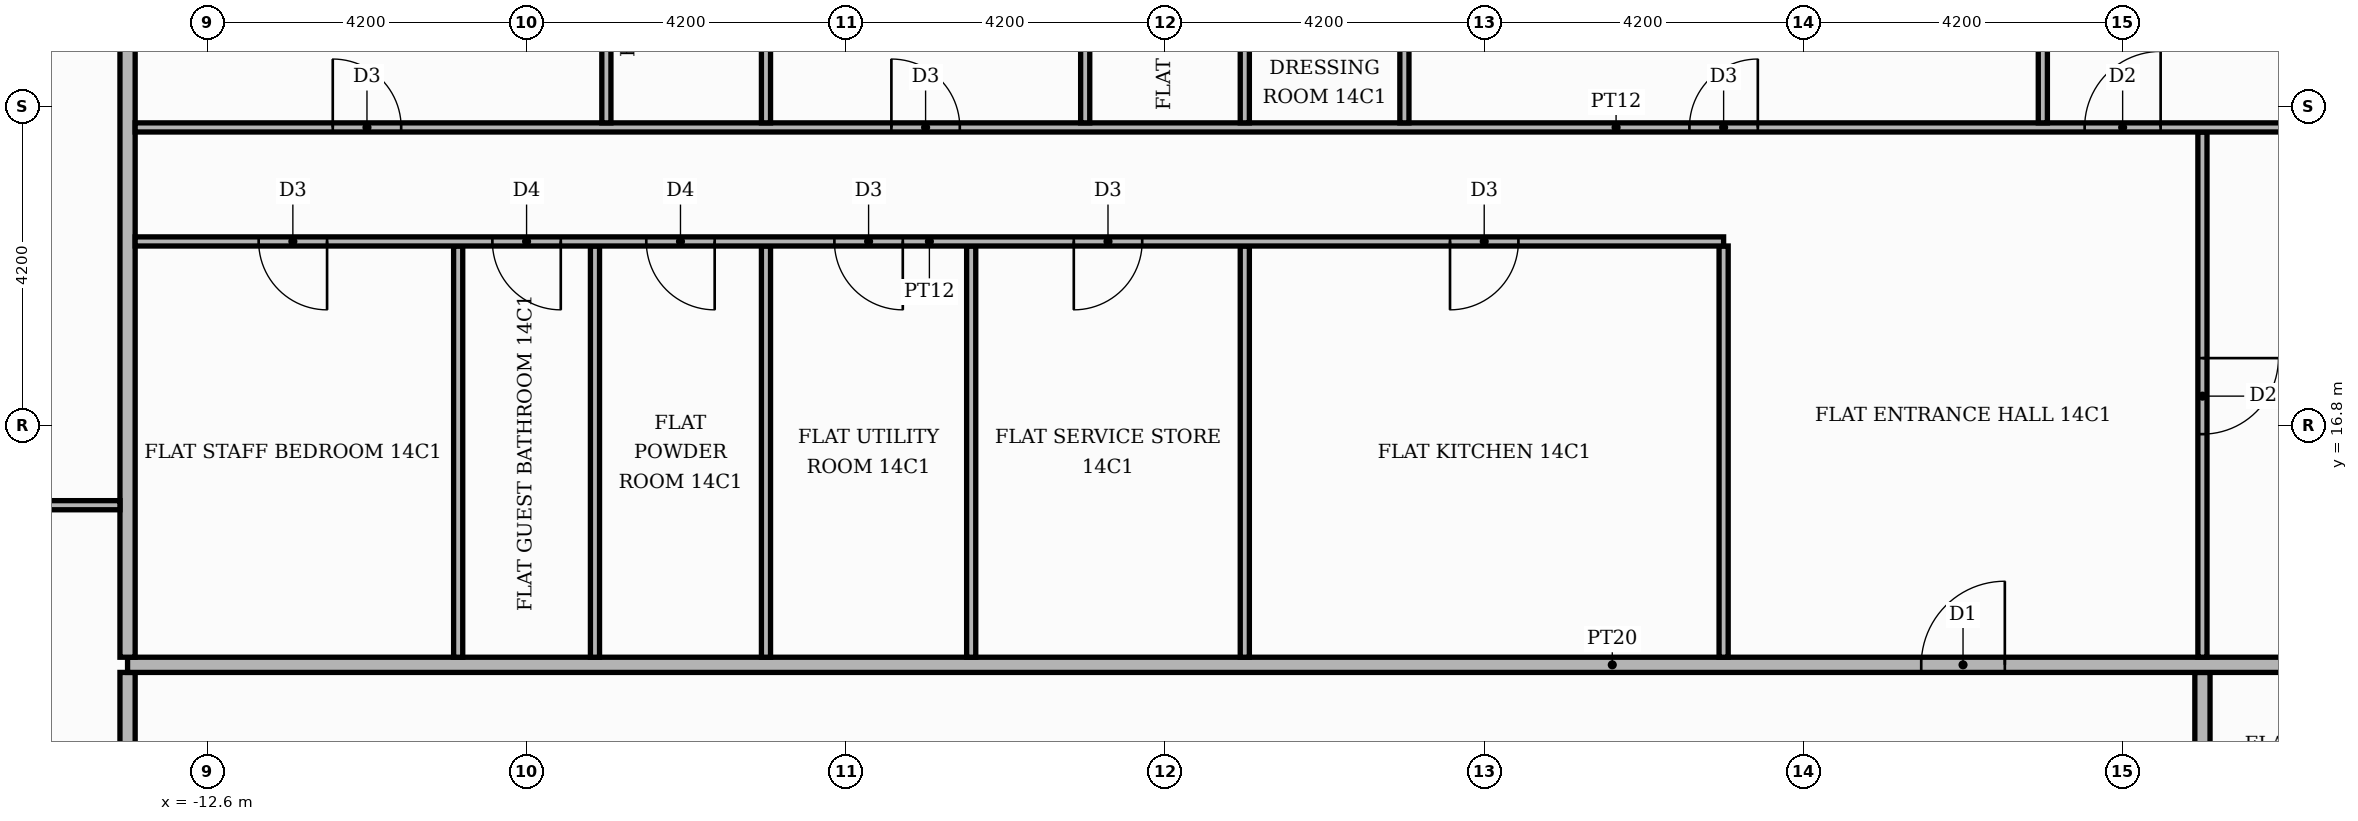
"""IFC4 building model, lengths in metres.
Left out: names, types, materials, properties, quantities, classifications, styles, units other than length and angle.
Written with IfcOpenShell. Run it as: python <this file> out.ifc"""

import sys

from ifc_helpers import new_model, si_unit, direction, frame, frame_2d, origin, place, context, subcontext, project, spatial, rectangle, extrude, element, fill, save


model = new_model("IFC4")
c1 = context("Model", 3, precision=1e-05, world=origin(), true_north=direction((0.0, 1.0)))
c2 = subcontext(c1, "Body", "Model", "MODEL_VIEW")
j1 = project(units=[si_unit("LENGTHUNIT", "METRE"), si_unit("PLANEANGLEUNIT", "RADIAN")], contexts=[c1])
p1 = place(None, origin())
s1 = spatial("IfcSite", under=j1, at=p1, CompositionType="ELEMENT")
p2 = place(p1, origin())
s2 = spatial("IfcBuilding", under=s1, at=p2, CompositionType="ELEMENT")
p3 = place(p2, frame((0.0, 0.0, 62.1)))
s3 = spatial("IfcBuildingStorey", under=s2, at=p3, CompositionType="ELEMENT", Elevation=62.1)
p4 = place(p3, frame((13.65, -5.15, 0.0), z_axis=(0.0, 0.0, 1.0), x_axis=(0.0, 1.0, 0.0)))
e1 = element("IfcWall", 1, at=p4, inside=s3, PredefinedType="PARTITIONING", context=c2, shape_type="SweptSolid", body=[
    extrude(rectangle(XDim=18.7, YDim=0.2, at=frame_2d((9.35, 0.0))), origin(), (0.0, 0.0, 1.0), 3.48),
])
p5 = place(p4, frame((5.65, 0.0, 0.0)))
e2 = element("IfcOpeningElement", 2, at=p5, cuts=e1, PredefinedType="OPENING", context=c2, shape_type="SweptSolid", body=[
    extrude(rectangle(XDim=1.1, YDim=2.4, at=frame_2d((0.55, 1.2))), frame((0.0, 0.11, 0.0), z_axis=(0.0, -1.0, 0.0), x_axis=(1.0, 0.0, 0.0)), (0.0, 0.0, 1.0), 0.22),
])
p6 = place(p3, frame((-13.65, 5.35, 0.0), z_axis=(0.0, 0.0, 1.0), x_axis=(0.0, 1.0, 0.0)))
e3 = element("IfcWall", 3, at=p6, inside=s3, PredefinedType="PARTITIONING", context=c2, shape_type="SweptSolid", body=[
    extrude(rectangle(XDim=8.2, YDim=0.2, at=frame_2d((4.1, 0.0))), origin(), (0.0, 0.0, 1.0), 3.48),
])
p7 = place(p6, frame((5.65, 0.0, 0.0)))
e4 = element("IfcOpeningElement", 4, at=p7, cuts=e3, PredefinedType="OPENING", context=c2, shape_type="SweptSolid", body=[
    extrude(rectangle(XDim=1.1, YDim=2.4, at=frame_2d((0.55, 1.2))), frame((0.0, 0.11, 0.0), z_axis=(0.0, -1.0, 0.0), x_axis=(1.0, 0.0, 0.0)), (0.0, 0.0, 1.0), 0.22),
])
p8 = place(p3, frame((-13.65, 13.65, 0.0), z_axis=(0.0, 0.0, 1.0), x_axis=(1.0, 0.0, 0.0)))
e5 = element("IfcWall", 5, at=p8, inside=s3, PredefinedType="PARTITIONING", context=c2, shape_type="SweptSolid", body=[
    extrude(rectangle(XDim=39.07, YDim=0.2, at=frame_2d((19.535, 0.0))), origin(), (0.0, 0.0, 1.0), 3.48),
])
p9 = place(p8, frame((23.6, 0.0, 0.0)))
e6 = element("IfcOpeningElement", 6, at=p9, cuts=e5, PredefinedType="OPENING", context=c2, shape_type="SweptSolid", body=[
    extrude(rectangle(XDim=1.1, YDim=2.4, at=frame_2d((0.55, 1.2))), frame((0.0, 0.11, 0.0), z_axis=(0.0, -1.0, 0.0), x_axis=(1.0, 0.0, 0.0)), (0.0, 0.0, 1.0), 0.22),
])
p10 = place(p3, frame((-13.65, 13.75, 0.0), z_axis=(0.0, 0.0, 1.0), x_axis=(0.0, 1.0, 0.0)))
e7 = element("IfcWall", 7, at=p10, inside=s3, PredefinedType="PARTITIONING", context=c2, shape_type="SweptSolid", body=[
    extrude(rectangle(XDim=11.67, YDim=0.2, at=frame_2d((5.835, 0.0))), origin(), (0.0, 0.0, 1.0), 3.48),
])
for number, where, z_axis, x_axis in (
    (8, (-9.3, 13.75, 0.0), (0.0, 0.0, 1.0), (0.0, 1.0, 0.0)),
    (9, (-7.5, 13.75, 0.0), (0.0, 0.0, 1.0), (0.0, 1.0, 0.0)),
    (10, (-5.25, 13.75, 0.0), (0.0, 0.0, 1.0), (0.0, 1.0, 0.0)),
    (11, (-2.55, 13.75, 0.0), (0.0, 0.0, 1.0), (0.0, 1.0, 0.0)),
    (12, (1.05, 13.75, 0.0), (0.0, 0.0, 1.0), (0.0, 1.0, 0.0)),
    (13, (7.35, 13.75, 0.0), (0.0, 0.0, 1.0), (0.0, 1.0, 0.0)),
):
    element("IfcWall", number, at=place(p3, frame(where, z_axis=z_axis, x_axis=x_axis)), inside=s3, PredefinedType="PARTITIONING", context=c2, shape_type="SweptSolid", body=[
        extrude(rectangle(XDim=5.41, YDim=0.12, at=frame_2d((2.705, 0.0))), origin(), (0.0, 0.0, 1.0), 3.48),
    ])
p11 = place(p3, frame((13.65, 13.75, 0.0), z_axis=(0.0, 0.0, 1.0), x_axis=(0.0, 1.0, 0.0)))
e14 = element("IfcWall", 14, at=p11, inside=s3, PredefinedType="PARTITIONING", context=c2, shape_type="SweptSolid", body=[
    extrude(rectangle(XDim=6.91, YDim=0.12, at=frame_2d((3.455, 0.0))), origin(), (0.0, 0.0, 1.0), 3.48),
])
p12 = place(p11, frame((2.935, 0.0, 0.0)))
e15 = element("IfcOpeningElement", 15, at=p12, cuts=e14, PredefinedType="OPENING", context=c2, shape_type="SweptSolid", body=[
    extrude(rectangle(XDim=1.0, YDim=2.1, at=frame_2d((0.5, 1.05))), frame((0.0, 0.07, 0.0), z_axis=(0.0, -1.0, 0.0), x_axis=(1.0, 0.0, 0.0)), (0.0, 0.0, 1.0), 0.14),
])
p13 = place(p3, frame((-20.12, 15.75, 0.0), z_axis=(0.0, 0.0, 1.0), x_axis=(1.0, 0.0, 0.0)))
e16 = element("IfcWall", 16, at=p13, inside=s3, PredefinedType="PARTITIONING", context=c2, shape_type="SweptSolid", body=[
    extrude(rectangle(XDim=6.37, YDim=0.12, at=frame_2d((3.185, 0.0))), origin(), (0.0, 0.0, 1.0), 3.48),
])
p14 = place(p13, frame((2.735, 0.0, 0.0)))
e17 = element("IfcOpeningElement", 17, at=p14, cuts=e16, PredefinedType="OPENING", context=c2, shape_type="SweptSolid", body=[
    extrude(rectangle(XDim=1.0, YDim=2.1, at=frame_2d((0.5, 1.05))), frame((0.0, 0.07, 0.0), z_axis=(0.0, -1.0, 0.0), x_axis=(1.0, 0.0, 0.0)), (0.0, 0.0, 1.0), 0.14),
])
p15 = place(p3, frame((-13.55, 19.22, 0.0), z_axis=(0.0, 0.0, 1.0), x_axis=(1.0, 0.0, 0.0)))
e18 = element("IfcWall", 18, at=p15, inside=s3, PredefinedType="PARTITIONING", context=c2, shape_type="SweptSolid", body=[
    extrude(rectangle(XDim=20.9, YDim=0.12, at=frame_2d((10.45, 0.0))), origin(), (0.0, 0.0, 1.0), 3.48),
])
p16 = place(p15, frame((17.3, 0.0, 0.0)))
e19 = element("IfcOpeningElement", 19, at=p16, cuts=e18, PredefinedType="OPENING", context=c2, shape_type="SweptSolid", body=[
    extrude(rectangle(XDim=0.9, YDim=2.1, at=frame_2d((0.45, 1.05))), frame((0.0, 0.07, 0.0), z_axis=(0.0, -1.0, 0.0), x_axis=(1.0, 0.0, 0.0)), (0.0, 0.0, 1.0), 0.14),
])
p17 = place(p15, frame((12.35, 0.0, 0.0)))
e20 = element("IfcOpeningElement", 20, at=p17, cuts=e18, PredefinedType="OPENING", context=c2, shape_type="SweptSolid", body=[
    extrude(rectangle(XDim=0.9, YDim=2.1, at=frame_2d((0.45, 1.05))), frame((0.0, 0.07, 0.0), z_axis=(0.0, -1.0, 0.0), x_axis=(1.0, 0.0, 0.0)), (0.0, 0.0, 1.0), 0.14),
])
p18 = place(p15, frame((9.2, 0.0, 0.0)))
e21 = element("IfcOpeningElement", 21, at=p18, cuts=e18, PredefinedType="OPENING", context=c2, shape_type="SweptSolid", body=[
    extrude(rectangle(XDim=0.9, YDim=2.1, at=frame_2d((0.45, 1.05))), frame((0.0, 0.07, 0.0), z_axis=(0.0, -1.0, 0.0), x_axis=(1.0, 0.0, 0.0)), (0.0, 0.0, 1.0), 0.14),
])
p19 = place(p15, frame((6.725, 0.0, 0.0)))
e22 = element("IfcOpeningElement", 22, at=p19, cuts=e18, PredefinedType="OPENING", context=c2, shape_type="SweptSolid", body=[
    extrude(rectangle(XDim=0.9, YDim=2.1, at=frame_2d((0.45, 1.05))), frame((0.0, 0.07, 0.0), z_axis=(0.0, -1.0, 0.0), x_axis=(1.0, 0.0, 0.0)), (0.0, 0.0, 1.0), 0.14),
])
p20 = place(p15, frame((4.7, 0.0, 0.0)))
e23 = element("IfcOpeningElement", 23, at=p20, cuts=e18, PredefinedType="OPENING", context=c2, shape_type="SweptSolid", body=[
    extrude(rectangle(XDim=0.9, YDim=2.1, at=frame_2d((0.45, 1.05))), frame((0.0, 0.07, 0.0), z_axis=(0.0, -1.0, 0.0), x_axis=(1.0, 0.0, 0.0)), (0.0, 0.0, 1.0), 0.14),
])
p21 = place(p15, frame((1.625, 0.0, 0.0)))
e24 = element("IfcOpeningElement", 24, at=p21, cuts=e18, PredefinedType="OPENING", context=c2, shape_type="SweptSolid", body=[
    extrude(rectangle(XDim=0.9, YDim=2.1, at=frame_2d((0.45, 1.05))), frame((0.0, 0.07, 0.0), z_axis=(0.0, -1.0, 0.0), x_axis=(1.0, 0.0, 0.0)), (0.0, 0.0, 1.0), 0.14),
])
p22 = place(p3, frame((-13.55, 20.72, 0.0), z_axis=(0.0, 0.0, 1.0), x_axis=(1.0, 0.0, 0.0)))
e25 = element("IfcWall", 25, at=p22, inside=s3, PredefinedType="PARTITIONING", context=c2, shape_type="SweptSolid", body=[
    extrude(rectangle(XDim=38.97, YDim=0.12, at=frame_2d((19.485, 0.0))), origin(), (0.0, 0.0, 1.0), 3.48),
])
p23 = place(p22, frame((25.65, 0.0, 0.0)))
e26 = element("IfcOpeningElement", 26, at=p23, cuts=e25, PredefinedType="OPENING", context=c2, shape_type="SweptSolid", body=[
    extrude(rectangle(XDim=1.0, YDim=2.1, at=frame_2d((0.5, 1.05))), frame((0.0, 0.07, 0.0), z_axis=(0.0, -1.0, 0.0), x_axis=(1.0, 0.0, 0.0)), (0.0, 0.0, 1.0), 0.14),
])
p24 = place(p22, frame((20.45, 0.0, 0.0)))
e27 = element("IfcOpeningElement", 27, at=p24, cuts=e25, PredefinedType="OPENING", context=c2, shape_type="SweptSolid", body=[
    extrude(rectangle(XDim=0.9, YDim=2.1, at=frame_2d((0.45, 1.05))), frame((0.0, 0.07, 0.0), z_axis=(0.0, -1.0, 0.0), x_axis=(1.0, 0.0, 0.0)), (0.0, 0.0, 1.0), 0.14),
])
p25 = place(p22, frame((9.95, 0.0, 0.0)))
e28 = element("IfcOpeningElement", 28, at=p25, cuts=e25, PredefinedType="OPENING", context=c2, shape_type="SweptSolid", body=[
    extrude(rectangle(XDim=0.9, YDim=2.1, at=frame_2d((0.45, 1.05))), frame((0.0, 0.07, 0.0), z_axis=(0.0, -1.0, 0.0), x_axis=(1.0, 0.0, 0.0)), (0.0, 0.0, 1.0), 0.14),
])
p26 = place(p22, frame((2.6, 0.0, 0.0)))
e29 = element("IfcOpeningElement", 29, at=p26, cuts=e25, PredefinedType="OPENING", context=c2, shape_type="SweptSolid", body=[
    extrude(rectangle(XDim=0.9, YDim=2.1, at=frame_2d((0.45, 1.05))), frame((0.0, 0.07, 0.0), z_axis=(0.0, -1.0, 0.0), x_axis=(1.0, 0.0, 0.0)), (0.0, 0.0, 1.0), 0.14),
])
p27 = place(p3, frame((-7.35, 20.78, 0.0), z_axis=(0.0, 0.0, 1.0), x_axis=(0.0, 1.0, 0.0)))
e30 = element("IfcWall", 30, at=p27, inside=s3, PredefinedType="PARTITIONING", context=c2, shape_type="SweptSolid", body=[
    extrude(rectangle(XDim=4.64, YDim=0.12, at=frame_2d((2.32, 0.0))), origin(), (0.0, 0.0, 1.0), 3.48),
])
p28 = place(p3, frame((-5.25, 20.78, 0.0), z_axis=(0.0, 0.0, 1.0), x_axis=(0.0, 1.0, 0.0)))
e31 = element("IfcWall", 31, at=p28, inside=s3, PredefinedType="PARTITIONING", context=c2, shape_type="SweptSolid", body=[
    extrude(rectangle(XDim=4.64, YDim=0.12, at=frame_2d((2.32, 0.0))), origin(), (0.0, 0.0, 1.0), 3.48),
])
p29 = place(p28, frame((1.99, 0.0, 0.0)))
e32 = element("IfcOpeningElement", 32, at=p29, cuts=e31, PredefinedType="OPENING", context=c2, shape_type="SweptSolid", body=[
    extrude(rectangle(XDim=0.9, YDim=2.1, at=frame_2d((0.45, 1.05))), frame((0.0, 0.07, 0.0), z_axis=(0.0, -1.0, 0.0), x_axis=(1.0, 0.0, 0.0)), (0.0, 0.0, 1.0), 0.14),
])
p30 = place(p3, frame((-1.05, 20.78, 0.0), z_axis=(0.0, 0.0, 1.0), x_axis=(0.0, 1.0, 0.0)))
e33 = element("IfcWall", 33, at=p30, inside=s3, PredefinedType="PARTITIONING", context=c2, shape_type="SweptSolid", body=[
    extrude(rectangle(XDim=4.64, YDim=0.12, at=frame_2d((2.32, 0.0))), origin(), (0.0, 0.0, 1.0), 3.48),
])
p31 = place(p3, frame((1.05, 20.78, 0.0), z_axis=(0.0, 0.0, 1.0), x_axis=(0.0, 1.0, 0.0)))
e34 = element("IfcWall", 34, at=p31, inside=s3, PredefinedType="PARTITIONING", context=c2, shape_type="SweptSolid", body=[
    extrude(rectangle(XDim=4.64, YDim=0.12, at=frame_2d((2.32, 0.0))), origin(), (0.0, 0.0, 1.0), 3.48),
])
p32 = place(p31, frame((1.99, 0.0, 0.0)))
e35 = element("IfcOpeningElement", 35, at=p32, cuts=e34, PredefinedType="OPENING", context=c2, shape_type="SweptSolid", body=[
    extrude(rectangle(XDim=0.9, YDim=2.1, at=frame_2d((0.45, 1.05))), frame((0.0, 0.07, 0.0), z_axis=(0.0, -1.0, 0.0), x_axis=(1.0, 0.0, 0.0)), (0.0, 0.0, 1.0), 0.14),
])
p33 = place(p3, frame((3.15, 20.78, 0.0), z_axis=(0.0, 0.0, 1.0), x_axis=(0.0, 1.0, 0.0)))
e36 = element("IfcWall", 36, at=p33, inside=s3, PredefinedType="PARTITIONING", context=c2, shape_type="SweptSolid", body=[
    extrude(rectangle(XDim=4.64, YDim=0.12, at=frame_2d((2.32, 0.0))), origin(), (0.0, 0.0, 1.0), 3.48),
])
p34 = place(p33, frame((1.99, 0.0, 0.0)))
e37 = element("IfcOpeningElement", 37, at=p34, cuts=e36, PredefinedType="OPENING", context=c2, shape_type="SweptSolid", body=[
    extrude(rectangle(XDim=0.9, YDim=2.1, at=frame_2d((0.45, 1.05))), frame((0.0, 0.07, 0.0), z_axis=(0.0, -1.0, 0.0), x_axis=(1.0, 0.0, 0.0)), (0.0, 0.0, 1.0), 0.14),
])
p35 = place(p3, frame((11.55, 20.78, 0.0), z_axis=(0.0, 0.0, 1.0), x_axis=(0.0, 1.0, 0.0)))
e38 = element("IfcWall", 38, at=p35, inside=s3, PredefinedType="PARTITIONING", context=c2, shape_type="SweptSolid", body=[
    extrude(rectangle(XDim=4.64, YDim=0.12, at=frame_2d((2.32, 0.0))), origin(), (0.0, 0.0, 1.0), 3.48),
])
p36 = place(p9, origin())
e39 = element("IfcDoor", 39, at=p36, inside=s3, OperationType="SINGLE_SWING_RIGHT", PredefinedType="DOOR", context=c2, shape_type="SweptSolid", body=[
    extrude(rectangle(XDim=1.1, YDim=2.4, at=frame_2d((0.55, 1.2))), frame((0.0, 0.025, 0.0), z_axis=(0.0, -1.0, 0.0), x_axis=(1.0, 0.0, 0.0)), (0.0, 0.0, 1.0), 0.05),
])
fill(e6, e39)
p37 = place(p12, frame((1.0, 0.0, 0.0), z_axis=(0.0, 0.0, 1.0), x_axis=(-1.0, 0.0, 0.0)))
e40 = element("IfcDoor", 40, at=p37, inside=s3, OperationType="SINGLE_SWING_RIGHT", PredefinedType="DOOR", context=c2, shape_type="SweptSolid", body=[
    extrude(rectangle(XDim=1.0, YDim=2.1, at=frame_2d((0.5, 1.05))), frame((0.0, 0.025, 0.0), z_axis=(0.0, -1.0, 0.0), x_axis=(1.0, 0.0, 0.0)), (0.0, 0.0, 1.0), 0.05),
])
fill(e15, e40)
p38 = place(p16, frame((0.9, 0.0, 0.0), z_axis=(0.0, 0.0, 1.0), x_axis=(-1.0, 0.0, 0.0)))
e41 = element("IfcDoor", 41, at=p38, inside=s3, OperationType="SINGLE_SWING_LEFT", PredefinedType="DOOR", context=c2, shape_type="SweptSolid", body=[
    extrude(rectangle(XDim=0.9, YDim=2.1, at=frame_2d((0.45, 1.05))), frame((0.0, 0.025, 0.0), z_axis=(0.0, -1.0, 0.0), x_axis=(1.0, 0.0, 0.0)), (0.0, 0.0, 1.0), 0.05),
])
fill(e19, e41)
p39 = place(p17, frame((0.9, 0.0, 0.0), z_axis=(0.0, 0.0, 1.0), x_axis=(-1.0, 0.0, 0.0)))
e42 = element("IfcDoor", 42, at=p39, inside=s3, OperationType="SINGLE_SWING_LEFT", PredefinedType="DOOR", context=c2, shape_type="SweptSolid", body=[
    extrude(rectangle(XDim=0.9, YDim=2.1, at=frame_2d((0.45, 1.05))), frame((0.0, 0.025, 0.0), z_axis=(0.0, -1.0, 0.0), x_axis=(1.0, 0.0, 0.0)), (0.0, 0.0, 1.0), 0.05),
])
fill(e20, e42)
p40 = place(p18, frame((0.9, 0.0, 0.0), z_axis=(0.0, 0.0, 1.0), x_axis=(-1.0, 0.0, 0.0)))
e43 = element("IfcDoor", 43, at=p40, inside=s3, OperationType="SINGLE_SWING_RIGHT", PredefinedType="DOOR", context=c2, shape_type="SweptSolid", body=[
    extrude(rectangle(XDim=0.9, YDim=2.1, at=frame_2d((0.45, 1.05))), frame((0.0, 0.025, 0.0), z_axis=(0.0, -1.0, 0.0), x_axis=(1.0, 0.0, 0.0)), (0.0, 0.0, 1.0), 0.05),
])
fill(e21, e43)
p41 = place(p19, frame((0.9, 0.0, 0.0), z_axis=(0.0, 0.0, 1.0), x_axis=(-1.0, 0.0, 0.0)))
e44 = element("IfcDoor", 44, at=p41, inside=s3, OperationType="SINGLE_SWING_RIGHT", PredefinedType="DOOR", context=c2, shape_type="SweptSolid", body=[
    extrude(rectangle(XDim=0.9, YDim=2.1, at=frame_2d((0.45, 1.05))), frame((0.0, 0.025, 0.0), z_axis=(0.0, -1.0, 0.0), x_axis=(1.0, 0.0, 0.0)), (0.0, 0.0, 1.0), 0.05),
])
fill(e22, e44)
p42 = place(p20, frame((0.9, 0.0, 0.0), z_axis=(0.0, 0.0, 1.0), x_axis=(-1.0, 0.0, 0.0)))
e45 = element("IfcDoor", 45, at=p42, inside=s3, OperationType="SINGLE_SWING_RIGHT", PredefinedType="DOOR", context=c2, shape_type="SweptSolid", body=[
    extrude(rectangle(XDim=0.9, YDim=2.1, at=frame_2d((0.45, 1.05))), frame((0.0, 0.025, 0.0), z_axis=(0.0, -1.0, 0.0), x_axis=(1.0, 0.0, 0.0)), (0.0, 0.0, 1.0), 0.05),
])
fill(e23, e45)
p43 = place(p21, frame((0.9, 0.0, 0.0), z_axis=(0.0, 0.0, 1.0), x_axis=(-1.0, 0.0, 0.0)))
e46 = element("IfcDoor", 46, at=p43, inside=s3, OperationType="SINGLE_SWING_RIGHT", PredefinedType="DOOR", context=c2, shape_type="SweptSolid", body=[
    extrude(rectangle(XDim=0.9, YDim=2.1, at=frame_2d((0.45, 1.05))), frame((0.0, 0.025, 0.0), z_axis=(0.0, -1.0, 0.0), x_axis=(1.0, 0.0, 0.0)), (0.0, 0.0, 1.0), 0.05),
])
fill(e24, e46)
p44 = place(p23, origin())
e47 = element("IfcDoor", 47, at=p44, inside=s3, OperationType="SINGLE_SWING_RIGHT", PredefinedType="DOOR", context=c2, shape_type="SweptSolid", body=[
    extrude(rectangle(XDim=1.0, YDim=2.1, at=frame_2d((0.5, 1.05))), frame((0.0, 0.025, 0.0), z_axis=(0.0, -1.0, 0.0), x_axis=(1.0, 0.0, 0.0)), (0.0, 0.0, 1.0), 0.05),
])
fill(e26, e47)
p45 = place(p24, origin())
e48 = element("IfcDoor", 48, at=p45, inside=s3, OperationType="SINGLE_SWING_RIGHT", PredefinedType="DOOR", context=c2, shape_type="SweptSolid", body=[
    extrude(rectangle(XDim=0.9, YDim=2.1, at=frame_2d((0.45, 1.05))), frame((0.0, 0.025, 0.0), z_axis=(0.0, -1.0, 0.0), x_axis=(1.0, 0.0, 0.0)), (0.0, 0.0, 1.0), 0.05),
])
fill(e27, e48)
p46 = place(p25, origin())
e49 = element("IfcDoor", 49, at=p46, inside=s3, OperationType="SINGLE_SWING_LEFT", PredefinedType="DOOR", context=c2, shape_type="SweptSolid", body=[
    extrude(rectangle(XDim=0.9, YDim=2.1, at=frame_2d((0.45, 1.05))), frame((0.0, 0.025, 0.0), z_axis=(0.0, -1.0, 0.0), x_axis=(1.0, 0.0, 0.0)), (0.0, 0.0, 1.0), 0.05),
])
fill(e28, e49)
p47 = place(p26, origin())
e50 = element("IfcDoor", 50, at=p47, inside=s3, OperationType="SINGLE_SWING_LEFT", PredefinedType="DOOR", context=c2, shape_type="SweptSolid", body=[
    extrude(rectangle(XDim=0.9, YDim=2.1, at=frame_2d((0.45, 1.05))), frame((0.0, 0.025, 0.0), z_axis=(0.0, -1.0, 0.0), x_axis=(1.0, 0.0, 0.0)), (0.0, 0.0, 1.0), 0.05),
])
fill(e29, e50)
save(model, sys.argv[1])
